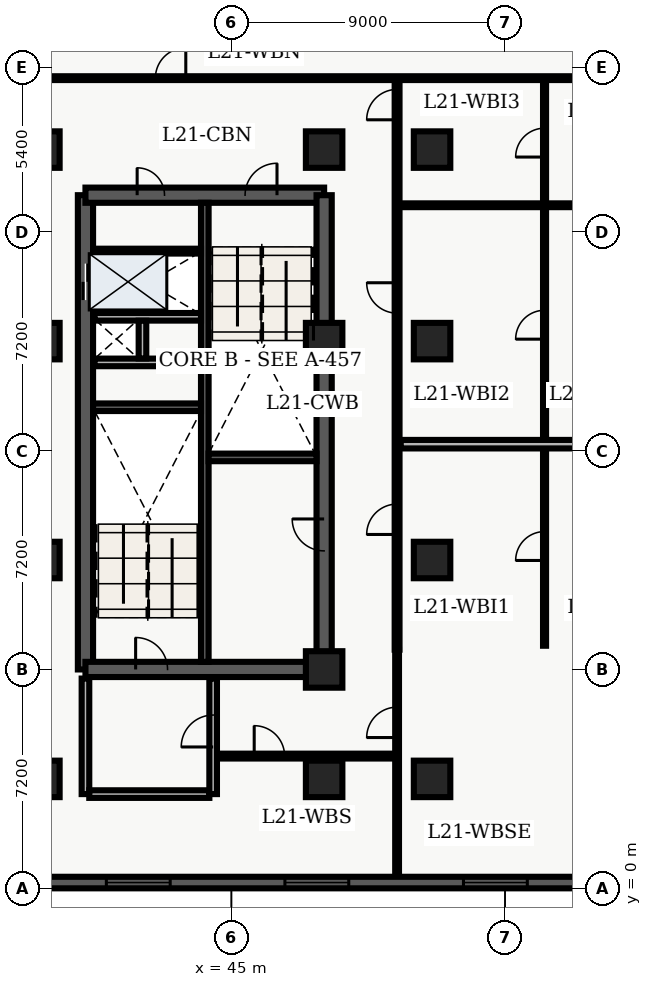
"""IFC4 building model, lengths in metres.
Left out: names, types, materials, properties, quantities, classifications, styles, units other than length and angle.
Written with IfcOpenShell. Run it as: python <this file> out.ifc"""

import sys

from ifc_helpers import new_model, entity, si_unit, converted_unit, direction, frame, origin_with_axes, origin_2d_with_axis, place, context, subcontext, project, spatial, polyline, rectangle, outline, extrude, element, fill, save


model = new_model("IFC4")
c1 = context("Model", 3, precision=1e-05, world=origin_with_axes(), true_north=direction((0.0, 1.0)))
c2 = subcontext(c1, "Body", "Model", "MODEL_VIEW")
j1 = project(units=[si_unit("LENGTHUNIT", "METRE"), converted_unit("PLANEANGLEUNIT", "DEGREE", entity("IfcPlaneAngleMeasure", 0.017), si_unit("PLANEANGLEUNIT", "RADIAN"), dimensions=[0, 0, 0, 0, 0, 0, 0])], contexts=[c1])
p1 = place(None, origin_with_axes())
s1 = spatial("IfcSite", under=j1, at=p1, CompositionType="ELEMENT")
p2 = place(p1, origin_with_axes())
s2 = spatial("IfcBuilding", under=s1, at=p2, CompositionType="ELEMENT")
p3 = place(p2, frame((0.0, 0.0, 89.1), z_axis=(0.0, 0.0, 1.0), x_axis=(1.0, 0.0, 0.0)))
s3 = spatial("IfcBuildingStorey", under=s2, at=p3, CompositionType="ELEMENT", Elevation=89.1)
p4 = place(p3, frame((40.2, 7.2, 0.0), z_axis=(0.0, 0.0, 1.0), x_axis=(0.0, 1.0, 0.0)))
e1 = element("IfcWall", 1, at=p4, inside=s3, PredefinedType="SHEAR", context=c2, shape_type="SweptSolid", body=[
    extrude(outline(polyline([(0.0, -0.25), (15.6, -0.25), (15.6, 0.25), (0.0, 0.25), (0.0, -0.25)])), origin_with_axes(), (0.0, 0.0, 1.0), 3.66),
])
p5 = place(p4, frame((12.75, 0.0, 0.0), z_axis=(0.0, 0.0, 1.0), x_axis=(1.0, 0.0, 0.0)))
e2 = element("IfcOpeningElement", 2, at=p5, cuts=e1, PredefinedType="OPENING", context=c2, shape_type="SweptSolid", body=[
    extrude(rectangle(XDim=1.2, YDim=0.52, at=origin_2d_with_axis()), origin_with_axes(), (0.0, 0.0, 1.0), 2.15),
])
p6 = place(p3, frame((40.2, 7.2, 0.0), z_axis=(0.0, 0.0, 1.0), x_axis=(1.0, 0.0, 0.0)))
e3 = element("IfcWall", 3, at=p6, inside=s3, PredefinedType="SHEAR", context=c2, shape_type="SweptSolid", body=[
    extrude(outline(polyline([(0.0, -0.25), (7.85, -0.25), (7.85, 0.25), (0.0, 0.25), (0.0, -0.25)])), origin_with_axes(), (0.0, 0.0, 1.0), 3.66),
])
p7 = place(p6, frame((2.175, 0.0, 0.0), z_axis=(0.0, 0.0, 1.0), x_axis=(1.0, 0.0, 0.0)))
e4 = element("IfcOpeningElement", 4, at=p7, cuts=e3, PredefinedType="OPENING", context=c2, shape_type="SweptSolid", body=[
    extrude(rectangle(XDim=1.05, YDim=0.52, at=origin_2d_with_axis()), origin_with_axes(), (0.0, 0.0, 1.0), 2.15),
])
p8 = place(p3, frame((40.2, 22.8, 0.0), z_axis=(0.0, 0.0, 1.0), x_axis=(1.0, 0.0, 0.0)))
e5 = element("IfcWall", 5, at=p8, inside=s3, PredefinedType="SHEAR", context=c2, shape_type="SweptSolid", body=[
    extrude(outline(polyline([(0.0, -0.25), (7.85, -0.25), (7.85, 0.25), (0.0, 0.25), (0.0, -0.25)])), origin_with_axes(), (0.0, 0.0, 1.0), 3.66),
])
p9 = place(p8, frame((5.775, 0.0, 0.0), z_axis=(0.0, 0.0, 1.0), x_axis=(1.0, 0.0, 0.0)))
e6 = element("IfcOpeningElement", 6, at=p9, cuts=e5, PredefinedType="OPENING", context=c2, shape_type="SweptSolid", body=[
    extrude(rectangle(XDim=1.05, YDim=0.52, at=origin_2d_with_axis()), origin_with_axes(), (0.0, 0.0, 1.0), 2.15),
])
p10 = place(p8, frame((2.15, 0.0, 0.0), z_axis=(0.0, 0.0, 1.0), x_axis=(1.0, 0.0, 0.0)))
e7 = element("IfcOpeningElement", 7, at=p10, cuts=e5, PredefinedType="OPENING", context=c2, shape_type="SweptSolid", body=[
    extrude(rectangle(XDim=0.9, YDim=0.52, at=origin_2d_with_axis()), origin_with_axes(), (0.0, 0.0, 1.0), 2.15),
])
p11 = place(p3, frame((48.05, 7.2, 0.0), z_axis=(0.0, 0.0, 1.0), x_axis=(0.0, 1.0, 0.0)))
e8 = element("IfcWall", 8, at=p11, inside=s3, PredefinedType="SHEAR", context=c2, shape_type="SweptSolid", body=[
    extrude(outline(polyline([(0.0, -0.25), (15.6, -0.25), (15.6, 0.25), (0.0, 0.25), (0.0, -0.25)])), origin_with_axes(), (0.0, 0.0, 1.0), 3.66),
])
p12 = place(p11, frame((4.425, 0.0, 0.0), z_axis=(0.0, 0.0, 1.0), x_axis=(1.0, 0.0, 0.0)))
e9 = element("IfcOpeningElement", 9, at=p12, cuts=e8, PredefinedType="OPENING", context=c2, shape_type="SweptSolid", body=[
    extrude(rectangle(XDim=1.05, YDim=0.52, at=origin_2d_with_axis()), origin_with_axes(), (0.0, 0.0, 1.0), 2.15),
])
p13 = place(p3, frame((44.125, 7.45, 0.0), z_axis=(0.0, 0.0, 1.0), x_axis=(0.0, 1.0, 0.0)))
e10 = element("IfcWall", 10, at=p13, inside=s3, PredefinedType="SHEAR", context=c2, shape_type="SweptSolid", body=[
    extrude(outline(polyline([(0.0, -0.125), (15.1, -0.125), (15.1, 0.125), (0.0, 0.125), (0.0, -0.125)])), origin_with_axes(), (0.0, 0.0, 1.0), 3.66),
])
for number, where, z_axis, x_axis in (
    (11, (40.45, 15.825, 0.0), (0.0, 0.0, 1.0), (1.0, 0.0, 0.0)),
    (12, (44.25, 14.175, 0.0), (0.0, 0.0, 1.0), (1.0, 0.0, 0.0)),
):
    element("IfcWall", number, at=place(p3, frame(where, z_axis=z_axis, x_axis=x_axis)), inside=s3, PredefinedType="SHEAR", context=c2, shape_type="SweptSolid", body=[
        extrude(outline(polyline([(0.0, -0.125), (3.55, -0.125), (3.55, 0.125), (0.0, 0.125), (0.0, -0.125)])), origin_with_axes(), (0.0, 0.0, 1.0), 3.66),
    ])
for number, where, z_axis, x_axis in (
    (13, (40.5, 17.3, 0.0), (0.0, 0.0, 1.0), (1.0, 0.0, 0.0)),
    (14, (40.5, 18.8, 0.0), (0.0, 0.0, 1.0), (1.0, 0.0, 0.0)),
):
    element("IfcWall", number, at=place(p3, frame(where, z_axis=z_axis, x_axis=x_axis)), inside=s3, PredefinedType="SOLIDWALL", context=c2, shape_type="SweptSolid", body=[
        extrude(outline(polyline([(0.0, -0.125), (3.5, -0.125), (3.5, 0.125), (0.0, 0.125), (0.0, -0.125)])), origin_with_axes(), (0.0, 0.0, 1.0), 2.7),
    ])
p14 = place(p3, frame((42.075, 17.43, 0.0), z_axis=(0.0, 0.0, 1.0), x_axis=(0.0, 1.0, 0.0)))
e15 = element("IfcWall", 15, at=p14, inside=s3, PredefinedType="SOLIDWALL", context=c2, shape_type="SweptSolid", body=[
    extrude(outline(polyline([(0.0, -0.125), (1.24, -0.125), (1.24, 0.125), (0.0, 0.125), (0.0, -0.125)])), origin_with_axes(), (0.0, 0.0, 1.0), 2.7),
])
p15 = place(p3, frame((40.2, 3.1, 0.0), z_axis=(0.0, 0.0, 1.0), x_axis=(0.0, 1.0, 0.0)))
e16 = element("IfcWall", 16, at=p15, inside=s3, PredefinedType="SOLIDWALL", context=c2, shape_type="SweptSolid", body=[
    extrude(outline(polyline([(0.0, -0.125), (3.8, -0.125), (3.8, 0.125), (0.0, 0.125), (0.0, -0.125)])), origin_with_axes(), (0.0, 0.0, 1.0), 2.7),
])
p16 = place(p3, frame((40.325, 3.1, 0.0), z_axis=(0.0, 0.0, 1.0), x_axis=(1.0, 0.0, 0.0)))
e17 = element("IfcWall", 17, at=p16, inside=s3, PredefinedType="SOLIDWALL", context=c2, shape_type="SweptSolid", body=[
    extrude(outline(polyline([(0.0, -0.125), (3.95, -0.125), (3.95, 0.125), (0.0, 0.125), (0.0, -0.125)])), origin_with_axes(), (0.0, 0.0, 1.0), 2.7),
])
p17 = place(p3, frame((44.4, 3.1, 0.0), z_axis=(0.0, 0.0, 1.0), x_axis=(0.0, 1.0, 0.0)))
e18 = element("IfcWall", 18, at=p17, inside=s3, PredefinedType="SOLIDWALL", context=c2, shape_type="SweptSolid", body=[
    extrude(outline(polyline([(0.0, -0.125), (3.8, -0.125), (3.8, 0.125), (0.0, 0.125), (0.0, -0.125)])), origin_with_axes(), (0.0, 0.0, 1.0), 2.7),
])
p18 = place(p17, frame((2.075, 0.0, 0.0), z_axis=(0.0, 0.0, 1.0), x_axis=(1.0, 0.0, 0.0)))
e19 = element("IfcOpeningElement", 19, at=p18, cuts=e18, PredefinedType="OPENING", context=c2, shape_type="SweptSolid", body=[
    extrude(rectangle(XDim=1.05, YDim=0.27, at=origin_2d_with_axis()), origin_with_axes(), (0.0, 0.0, 1.0), 2.15),
])
for number, where, z_axis, x_axis in (
    (20, (38.75, 3.6, 0.0), (0.0, 0.0, 1.0), (1.0, 0.0, 0.0)),
    (21, (38.75, 10.8, 0.0), (0.0, 0.0, 1.0), (1.0, 0.0, 0.0)),
    (22, (38.75, 18.0, 0.0), (0.0, 0.0, 1.0), (1.0, 0.0, 0.0)),
    (23, (38.75, 24.3, 0.0), (0.0, 0.0, 1.0), (1.0, 0.0, 0.0)),
    (24, (48.05, 3.6, 0.0), (0.0, 0.0, 1.0), (1.0, 0.0, 0.0)),
    (25, (48.05, 7.2, 0.0), (0.0, 0.0, 1.0), (1.0, 0.0, 0.0)),
    (26, (48.05, 18.0, 0.0), (0.0, 0.0, 1.0), (1.0, 0.0, 0.0)),
    (27, (48.05, 24.3, 0.0), (0.0, 0.0, 1.0), (1.0, 0.0, 0.0)),
    (28, (51.6, 3.6, 0.0), (0.0, 0.0, 1.0), (1.0, 0.0, 0.0)),
    (29, (51.6, 10.8, 0.0), (0.0, 0.0, 1.0), (1.0, 0.0, 0.0)),
    (30, (51.6, 18.0, 0.0), (0.0, 0.0, 1.0), (1.0, 0.0, 0.0)),
    (31, (51.6, 24.3, 0.0), (0.0, 0.0, 1.0), (1.0, 0.0, 0.0)),
):
    element("IfcColumn", number, at=place(p3, frame(where, z_axis=z_axis, x_axis=x_axis)), inside=s3, PredefinedType="COLUMN", context=c2, shape_type="SweptSolid", body=[
        extrude(rectangle(XDim=1.2, YDim=1.2, at=origin_2d_with_axis()), origin_with_axes(), (0.0, 0.0, 1.0), 3.9),
    ])
p19 = place(p3, frame((40.5, 20.96, 0.0), z_axis=(0.0, 0.0, 1.0), x_axis=(1.0, 0.0, 0.0)))
e32 = element("IfcWall", 32, at=p19, inside=s3, PredefinedType="PARTITIONING", context=c2, shape_type="SweptSolid", body=[
    extrude(outline(polyline([(0.0, -0.08), (3.5, -0.08), (3.5, 0.08), (0.0, 0.08), (0.0, -0.08)])), origin_with_axes(), (0.0, 0.0, 1.0), 2.7),
])
p20 = place(p3, frame((50.45, 7.85, 0.0), z_axis=(0.0, 0.0, 1.0), x_axis=(0.0, 1.0, 0.0)))
e33 = element("IfcWall", 33, at=p20, inside=s3, PredefinedType="PARTITIONING", context=c2, shape_type="SweptSolid", body=[
    extrude(outline(polyline([(0.0, -0.08), (18.8, -0.08), (18.8, 0.08), (0.0, 0.08), (0.0, -0.08)])), origin_with_axes(), (0.0, 0.0, 1.0), 2.7),
])
p21 = place(p20, frame((4.29, 0.0, 0.0), z_axis=(0.0, 0.0, 1.0), x_axis=(1.0, 0.0, 0.0)))
e34 = element("IfcOpeningElement", 34, at=p21, cuts=e33, PredefinedType="OPENING", context=c2, shape_type="SweptSolid", body=[
    extrude(rectangle(XDim=1.0, YDim=0.18, at=origin_2d_with_axis()), origin_with_axes(), (0.0, 0.0, 1.0), 2.15),
])
p22 = place(p20, frame((11.57, 0.0, 0.0), z_axis=(0.0, 0.0, 1.0), x_axis=(1.0, 0.0, 0.0)))
e35 = element("IfcOpeningElement", 35, at=p22, cuts=e33, PredefinedType="OPENING", context=c2, shape_type="SweptSolid", body=[
    extrude(rectangle(XDim=1.0, YDim=0.18, at=origin_2d_with_axis()), origin_with_axes(), (0.0, 0.0, 1.0), 2.15),
])
p23 = place(p20, frame((17.93, 0.0, 0.0), z_axis=(0.0, 0.0, 1.0), x_axis=(1.0, 0.0, 0.0)))
e36 = element("IfcOpeningElement", 36, at=p23, cuts=e33, PredefinedType="OPENING", context=c2, shape_type="SweptSolid", body=[
    extrude(rectangle(XDim=1.0, YDim=0.18, at=origin_2d_with_axis()), origin_with_axes(), (0.0, 0.0, 1.0), 2.15),
])
p24 = place(p3, frame((38.76, 26.65, 0.0), z_axis=(0.0, 0.0, 1.0), x_axis=(1.0, 0.0, 0.0)))
e37 = element("IfcWall", 37, at=p24, inside=s3, PredefinedType="PARTITIONING", context=c2, shape_type="SweptSolid", body=[
    extrude(outline(polyline([(0.0, -0.062), (20.88, -0.062), (20.88, 0.062), (0.0, 0.062), (0.0, -0.062)])), origin_with_axes(), (0.0, 0.0, 1.0), 2.7),
])
p25 = place(p24, frame((4.24, 0.0, 0.0), z_axis=(0.0, 0.0, 1.0), x_axis=(1.0, 0.0, 0.0)))
e38 = element("IfcOpeningElement", 38, at=p25, cuts=e37, PredefinedType="OPENING", context=c2, shape_type="SweptSolid", body=[
    extrude(rectangle(XDim=1.0, YDim=0.145, at=origin_2d_with_axis()), origin_with_axes(), (0.0, 0.0, 1.0), 2.15),
])
p26 = place(p3, frame((44.55, 4.35, 0.0), z_axis=(0.0, 0.0, 1.0), x_axis=(1.0, 0.0, 0.0)))
e39 = element("IfcWall", 39, at=p26, inside=s3, PredefinedType="PARTITIONING", context=c2, shape_type="SweptSolid", body=[
    extrude(outline(polyline([(0.0, -0.08), (5.9, -0.08), (5.9, 0.08), (0.0, 0.08), (0.0, -0.08)])), origin_with_axes(), (0.0, 0.0, 1.0), 2.7),
])
p27 = place(p26, frame((1.7, 0.0, 0.0), z_axis=(0.0, 0.0, 1.0), x_axis=(1.0, 0.0, 0.0)))
e40 = element("IfcOpeningElement", 40, at=p27, cuts=e39, PredefinedType="OPENING", context=c2, shape_type="SweptSolid", body=[
    extrude(rectangle(XDim=1.0, YDim=0.18, at=origin_2d_with_axis()), origin_with_axes(), (0.0, 0.0, 1.0), 2.15),
])
p28 = place(p3, frame((50.45, 0.36, 0.0), z_axis=(0.0, 0.0, 1.0), x_axis=(0.0, 1.0, 0.0)))
e41 = element("IfcWall", 41, at=p28, inside=s3, PredefinedType="PARTITIONING", context=c2, shape_type="SweptSolid", body=[
    extrude(outline(polyline([(0.0, -0.062), (7.49, -0.062), (7.49, 0.062), (0.0, 0.062), (0.0, -0.062)])), origin_with_axes(), (0.0, 0.0, 1.0), 2.7),
])
p29 = place(p28, frame((5.1, 0.0, 0.0), z_axis=(0.0, 0.0, 1.0), x_axis=(1.0, 0.0, 0.0)))
e42 = element("IfcOpeningElement", 42, at=p29, cuts=e41, PredefinedType="OPENING", context=c2, shape_type="SweptSolid", body=[
    extrude(rectangle(XDim=1.0, YDim=0.145, at=origin_2d_with_axis()), origin_with_axes(), (0.0, 0.0, 1.0), 2.15),
])
p30 = place(p3, frame((55.3, 7.98, 0.0), z_axis=(0.0, 0.0, 1.0), x_axis=(0.0, 1.0, 0.0)))
e43 = element("IfcWall", 43, at=p30, inside=s3, PredefinedType="PARTITIONING", context=c2, shape_type="SweptSolid", body=[
    extrude(outline(polyline([(0.0, -0.05), (18.54, -0.05), (18.54, 0.05), (0.0, 0.05), (0.0, -0.05)])), origin_with_axes(), (0.0, 0.0, 1.0), 2.7),
])
p31 = place(p30, frame((3.28, 0.0, 0.0), z_axis=(0.0, 0.0, 1.0), x_axis=(1.0, 0.0, 0.0)))
e44 = element("IfcOpeningElement", 44, at=p31, cuts=e43, PredefinedType="OPENING", context=c2, shape_type="SweptSolid", body=[
    extrude(rectangle(XDim=0.95, YDim=0.12, at=origin_2d_with_axis()), origin_with_axes(), (0.0, 0.0, 1.0), 2.15),
])
p32 = place(p30, frame((10.559, 0.0, 0.0), z_axis=(0.0, 0.0, 1.0), x_axis=(1.0, 0.0, 0.0)))
e45 = element("IfcOpeningElement", 45, at=p32, cuts=e43, PredefinedType="OPENING", context=c2, shape_type="SweptSolid", body=[
    extrude(rectangle(XDim=0.95, YDim=0.12, at=origin_2d_with_axis()), origin_with_axes(), (0.0, 0.0, 1.0), 2.15),
])
p33 = place(p30, frame((16.549, 0.0, 0.0), z_axis=(0.0, 0.0, 1.0), x_axis=(1.0, 0.0, 0.0)))
e46 = element("IfcOpeningElement", 46, at=p33, cuts=e43, PredefinedType="OPENING", context=c2, shape_type="SweptSolid", body=[
    extrude(rectangle(XDim=0.95, YDim=0.12, at=origin_2d_with_axis()), origin_with_axes(), (0.0, 0.0, 1.0), 2.15),
])
p34 = place(p3, frame((50.57, 14.61, 0.0), z_axis=(0.0, 0.0, 1.0), x_axis=(1.0, 0.0, 0.0)))
e47 = element("IfcWall", 47, at=p34, inside=s3, PredefinedType="PARTITIONING", context=c2, shape_type="SweptSolid", body=[
    extrude(outline(polyline([(0.0, -0.14), (9.055, -0.14), (9.055, 0.14), (0.0, 0.14), (0.0, -0.14)])), origin_with_axes(), (0.0, 0.0, 1.0), 2.7),
])
p35 = place(p3, frame((50.57, 22.469, 0.0), z_axis=(0.0, 0.0, 1.0), x_axis=(1.0, 0.0, 0.0)))
e48 = element("IfcWall", 48, at=p35, inside=s3, PredefinedType="PARTITIONING", context=c2, shape_type="SweptSolid", body=[
    extrude(outline(polyline([(0.0, -0.062), (9.055, -0.062), (9.055, 0.062), (0.0, 0.062), (0.0, -0.062)])), origin_with_axes(), (0.0, 0.0, 1.0), 2.7),
])
p36 = place(p3, frame((57.22, 0.19, 0.0), z_axis=(0.0, 0.0, 1.0), x_axis=(-1.0, 0.0, 0.0)))
e49 = element("IfcWall", 49, at=p36, inside=s3, PredefinedType="SOLIDWALL", context=c2, shape_type="SweptSolid", body=[
    extrude(outline(polyline([(0.0, -0.19), (18.82, -0.19), (18.82, 0.19), (0.0, 0.19), (0.0, -0.19)])), origin_with_axes(), (0.0, 0.0, 1.0), 3.66),
])
p37 = place(p36, frame((3.537, 0.0, 0.45), z_axis=(0.0, 0.0, 1.0), x_axis=(1.0, 0.0, 0.0)))
e50 = element("IfcOpeningElement", 50, at=p37, cuts=e49, PredefinedType="OPENING", context=c2, shape_type="SweptSolid", body=[
    extrude(rectangle(XDim=2.1, YDim=0.4, at=origin_2d_with_axis()), origin_with_axes(), (0.0, 0.0, 1.0), 2.2),
])
p38 = place(p36, frame((9.41, 0.0, 0.45), z_axis=(0.0, 0.0, 1.0), x_axis=(1.0, 0.0, 0.0)))
e51 = element("IfcOpeningElement", 51, at=p38, cuts=e49, PredefinedType="OPENING", context=c2, shape_type="SweptSolid", body=[
    extrude(rectangle(XDim=2.1, YDim=0.4, at=origin_2d_with_axis()), origin_with_axes(), (0.0, 0.0, 1.0), 2.2),
])
p39 = place(p36, frame((15.283, 0.0, 0.45), z_axis=(0.0, 0.0, 1.0), x_axis=(1.0, 0.0, 0.0)))
e52 = element("IfcOpeningElement", 52, at=p39, cuts=e49, PredefinedType="OPENING", context=c2, shape_type="SweptSolid", body=[
    extrude(rectangle(XDim=2.1, YDim=0.4, at=origin_2d_with_axis()), origin_with_axes(), (0.0, 0.0, 1.0), 2.2),
])
p40 = place(p4, frame((12.75, 0.0, 0.0), z_axis=(0.0, 0.0, 1.0), x_axis=(1.0, 0.0, 0.0)))
e53 = element("IfcDoor", 53, at=p40, inside=s3, OperationType="DOUBLE_DOOR_SLIDING", PredefinedType="DOOR", context=c2, shape_type="SweptSolid", body=[
    extrude(rectangle(XDim=1.2, YDim=0.09, at=origin_2d_with_axis()), origin_with_axes(), (0.0, 0.0, 1.0), 2.15),
])
fill(e2, e53)
p41 = place(p6, frame((2.175, 0.0, 0.0), z_axis=(0.0, 0.0, 1.0), x_axis=(1.0, 0.0, 0.0)))
e54 = element("IfcDoor", 54, at=p41, inside=s3, OperationType="SINGLE_SWING_LEFT", PredefinedType="DOOR", context=c2, shape_type="SweptSolid", body=[
    extrude(rectangle(XDim=1.05, YDim=0.09, at=origin_2d_with_axis()), origin_with_axes(), (0.0, 0.0, 1.0), 2.15),
])
fill(e4, e54)
p42 = place(p8, frame((5.775, 0.0, 0.0), z_axis=(0.0, 0.0, 1.0), x_axis=(1.0, 0.0, 0.0)))
e55 = element("IfcDoor", 55, at=p42, inside=s3, OperationType="SINGLE_SWING_RIGHT", PredefinedType="DOOR", context=c2, shape_type="SweptSolid", body=[
    extrude(rectangle(XDim=1.05, YDim=0.09, at=origin_2d_with_axis()), origin_with_axes(), (0.0, 0.0, 1.0), 2.15),
])
fill(e6, e55)
p43 = place(p17, frame((2.075, 0.0, 0.0), z_axis=(0.0, 0.0, 1.0), x_axis=(1.0, 0.0, 0.0)))
e56 = element("IfcDoor", 56, at=p43, inside=s3, OperationType="SINGLE_SWING_LEFT", PredefinedType="DOOR", context=c2, shape_type="SweptSolid", body=[
    extrude(rectangle(XDim=1.05, YDim=0.09, at=origin_2d_with_axis()), origin_with_axes(), (0.0, 0.0, 1.0), 2.15),
])
fill(e19, e56)
p44 = place(p8, frame((2.15, 0.0, 0.0), z_axis=(0.0, 0.0, 1.0), x_axis=(1.0, 0.0, 0.0)))
e57 = element("IfcDoor", 57, at=p44, inside=s3, OperationType="SINGLE_SWING_LEFT", PredefinedType="DOOR", context=c2, shape_type="SweptSolid", body=[
    extrude(rectangle(XDim=0.9, YDim=0.09, at=origin_2d_with_axis()), origin_with_axes(), (0.0, 0.0, 1.0), 2.15),
])
fill(e7, e57)
p45 = place(p11, frame((4.425, 0.0, 0.0), z_axis=(0.0, 0.0, 1.0), x_axis=(1.0, 0.0, 0.0)))
e58 = element("IfcDoor", 58, at=p45, inside=s3, OperationType="SINGLE_SWING_RIGHT", PredefinedType="DOOR", context=c2, shape_type="SweptSolid", body=[
    extrude(rectangle(XDim=1.05, YDim=0.09, at=origin_2d_with_axis()), origin_with_axes(), (0.0, 0.0, 1.0), 2.15),
])
fill(e9, e58)
p46 = place(p26, frame((1.7, 0.0, 0.0), z_axis=(0.0, 0.0, 1.0), x_axis=(1.0, 0.0, 0.0)))
e59 = element("IfcDoor", 59, at=p46, inside=s3, OperationType="SINGLE_SWING_LEFT", PredefinedType="DOOR", context=c2, shape_type="SweptSolid", body=[
    extrude(rectangle(XDim=1.0, YDim=0.09, at=origin_2d_with_axis()), origin_with_axes(), (0.0, 0.0, 1.0), 2.15),
])
fill(e40, e59)
p47 = place(p28, frame((5.1, 0.0, 0.0), z_axis=(0.0, 0.0, 1.0), x_axis=(1.0, 0.0, 0.0)))
e60 = element("IfcDoor", 60, at=p47, inside=s3, OperationType="SINGLE_SWING_LEFT", PredefinedType="DOOR", context=c2, shape_type="SweptSolid", body=[
    extrude(rectangle(XDim=1.0, YDim=0.075, at=origin_2d_with_axis()), origin_with_axes(), (0.0, 0.0, 1.0), 2.15),
])
fill(e42, e60)
p48 = place(p24, frame((4.24, 0.0, 0.0), z_axis=(0.0, 0.0, 1.0), x_axis=(1.0, 0.0, 0.0)))
e61 = element("IfcDoor", 61, at=p48, inside=s3, OperationType="SINGLE_SWING_RIGHT", PredefinedType="DOOR", context=c2, shape_type="SweptSolid", body=[
    extrude(rectangle(XDim=1.0, YDim=0.075, at=origin_2d_with_axis()), origin_with_axes(), (0.0, 0.0, 1.0), 2.15),
])
fill(e38, e61)
p49 = place(p30, frame((3.28, 0.0, 0.0), z_axis=(0.0, 0.0, 1.0), x_axis=(1.0, 0.0, 0.0)))
e62 = element("IfcDoor", 62, at=p49, inside=s3, OperationType="SINGLE_SWING_LEFT", PredefinedType="DOOR", context=c2, shape_type="SweptSolid", body=[
    extrude(rectangle(XDim=0.95, YDim=0.06, at=origin_2d_with_axis()), origin_with_axes(), (0.0, 0.0, 1.0), 2.15),
])
fill(e44, e62)
p50 = place(p20, frame((4.29, 0.0, 0.0), z_axis=(0.0, 0.0, 1.0), x_axis=(1.0, 0.0, 0.0)))
e63 = element("IfcDoor", 63, at=p50, inside=s3, OperationType="SINGLE_SWING_LEFT", PredefinedType="DOOR", context=c2, shape_type="SweptSolid", body=[
    extrude(rectangle(XDim=1.0, YDim=0.09, at=origin_2d_with_axis()), origin_with_axes(), (0.0, 0.0, 1.0), 2.15),
])
fill(e34, e63)
p51 = place(p30, frame((10.559, 0.0, 0.0), z_axis=(0.0, 0.0, 1.0), x_axis=(1.0, 0.0, 0.0)))
e64 = element("IfcDoor", 64, at=p51, inside=s3, OperationType="SINGLE_SWING_LEFT", PredefinedType="DOOR", context=c2, shape_type="SweptSolid", body=[
    extrude(rectangle(XDim=0.95, YDim=0.06, at=origin_2d_with_axis()), origin_with_axes(), (0.0, 0.0, 1.0), 2.15),
])
fill(e45, e64)
p52 = place(p20, frame((11.57, 0.0, 0.0), z_axis=(0.0, 0.0, 1.0), x_axis=(1.0, 0.0, 0.0)))
e65 = element("IfcDoor", 65, at=p52, inside=s3, OperationType="SINGLE_SWING_RIGHT", PredefinedType="DOOR", context=c2, shape_type="SweptSolid", body=[
    extrude(rectangle(XDim=1.0, YDim=0.09, at=origin_2d_with_axis()), origin_with_axes(), (0.0, 0.0, 1.0), 2.15),
])
fill(e35, e65)
p53 = place(p30, frame((16.549, 0.0, 0.0), z_axis=(0.0, 0.0, 1.0), x_axis=(1.0, 0.0, 0.0)))
e66 = element("IfcDoor", 66, at=p53, inside=s3, OperationType="SINGLE_SWING_LEFT", PredefinedType="DOOR", context=c2, shape_type="SweptSolid", body=[
    extrude(rectangle(XDim=0.95, YDim=0.06, at=origin_2d_with_axis()), origin_with_axes(), (0.0, 0.0, 1.0), 2.15),
])
fill(e46, e66)
p54 = place(p20, frame((17.93, 0.0, 0.0), z_axis=(0.0, 0.0, 1.0), x_axis=(1.0, 0.0, 0.0)))
e67 = element("IfcDoor", 67, at=p54, inside=s3, OperationType="SINGLE_SWING_LEFT", PredefinedType="DOOR", context=c2, shape_type="SweptSolid", body=[
    extrude(rectangle(XDim=1.0, YDim=0.09, at=origin_2d_with_axis()), origin_with_axes(), (0.0, 0.0, 1.0), 2.15),
])
fill(e36, e67)
p55 = place(p36, frame((3.537, 0.0, 0.45), z_axis=(0.0, 0.0, 1.0), x_axis=(1.0, 0.0, 0.0)))
e68 = element("IfcWindow", 68, at=p55, inside=s3, PredefinedType="WINDOW", context=c2, shape_type="SweptSolid", body=[
    extrude(rectangle(XDim=2.1, YDim=0.09, at=origin_2d_with_axis()), origin_with_axes(), (0.0, 0.0, 1.0), 2.2),
])
fill(e50, e68)
p56 = place(p36, frame((9.41, 0.0, 0.45), z_axis=(0.0, 0.0, 1.0), x_axis=(1.0, 0.0, 0.0)))
e69 = element("IfcWindow", 69, at=p56, inside=s3, PredefinedType="WINDOW", context=c2, shape_type="SweptSolid", body=[
    extrude(rectangle(XDim=2.1, YDim=0.09, at=origin_2d_with_axis()), origin_with_axes(), (0.0, 0.0, 1.0), 2.2),
])
fill(e51, e69)
p57 = place(p36, frame((15.283, 0.0, 0.45), z_axis=(0.0, 0.0, 1.0), x_axis=(1.0, 0.0, 0.0)))
e70 = element("IfcWindow", 70, at=p57, inside=s3, PredefinedType="WINDOW", context=c2, shape_type="SweptSolid", body=[
    extrude(rectangle(XDim=2.1, YDim=0.09, at=origin_2d_with_axis()), origin_with_axes(), (0.0, 0.0, 1.0), 2.2),
])
fill(e52, e70)
save(model, sys.argv[1])
